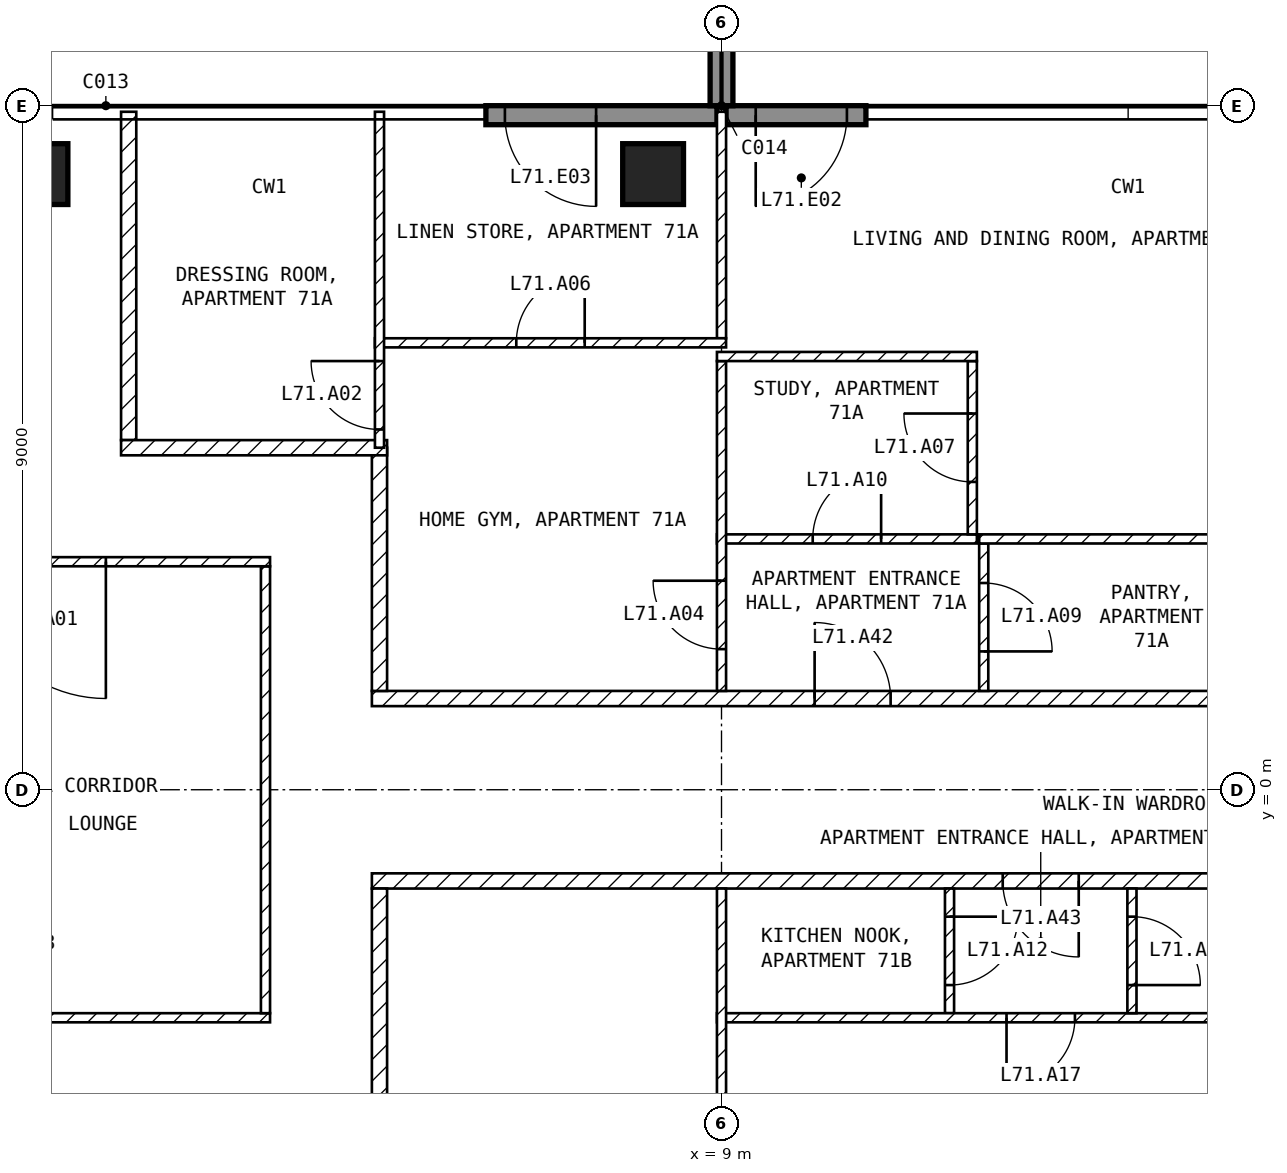
"""IFC4 building model, lengths in metres.
Left out: names, types, materials, properties, quantities, classifications, styles, units other than length and angle.
Written with IfcOpenShell. Run it as: python <this file> out.ifc"""

import sys

from ifc_helpers import new_model, si_unit, direction, frame, frame_2d, origin, origin_2d, place, context, subcontext, project, spatial, rectangle, extrude, element, fill, save


model = new_model("IFC4")
c1 = context("Model", 3, precision=1e-05, world=origin(), true_north=direction((0.0, 1.0)))
c2 = subcontext(c1, "Body", "Model", "MODEL_VIEW")
j1 = project(units=[si_unit("LENGTHUNIT", "METRE"), si_unit("PLANEANGLEUNIT", "RADIAN")], contexts=[c1])
p1 = place(None, origin())
s1 = spatial("IfcSite", under=j1, at=p1, CompositionType="ELEMENT")
p2 = place(p1, origin())
s2 = spatial("IfcBuilding", under=s1, at=p2, CompositionType="ELEMENT")
p3 = place(p2, frame((0.0, 0.0, 278.0)))
s3 = spatial("IfcBuildingStorey", under=s2, at=p3, CompositionType="ELEMENT", Elevation=278.0)
for number, where, z_axis, x_axis in (
    (1, (0.0, 8.1, -0.25), (0.0, 0.0, 1.0), (1.0, 0.0, 0.0)),
    (2, (8.1, 8.1, -0.25), (0.0, 0.0, 1.0), (1.0, 0.0, 0.0)),
):
    element("IfcColumn", number, at=place(p3, frame(where, z_axis=z_axis, x_axis=x_axis)), inside=s3, PredefinedType="COLUMN", context=c2, shape_type="SweptSolid", body=[
        extrude(rectangle(XDim=0.8, YDim=0.8, at=origin_2d()), origin(), (0.0, 0.0, 1.0), 3.5),
    ])
p4 = place(p3, frame((10.9, 8.875, 0.0), z_axis=(0.0, 0.0, 1.0), x_axis=(-1.0, 0.0, 0.0)))
e3 = element("IfcWall", 3, at=p4, inside=s3, PredefinedType="SOLIDWALL", context=c2, shape_type="SweptSolid", body=[
    extrude(rectangle(XDim=1.84, YDim=0.25, at=frame_2d((0.92, 0.0))), origin(), (0.0, 0.0, 1.0), 3.25),
])
p5 = place(p4, frame((0.25, 0.0, 0.0)))
e4 = element("IfcOpeningElement", 4, at=p5, cuts=e3, PredefinedType="OPENING", context=c2, shape_type="SweptSolid", body=[
    extrude(rectangle(XDim=1.2, YDim=2.4, at=frame_2d((0.6, 1.2))), frame((0.0, 0.135, 0.0), z_axis=(0.0, -1.0, 0.0), x_axis=(1.0, 0.0, 0.0)), (0.0, 0.0, 1.0), 0.27),
])
p6 = place(p3, frame((8.94, 8.875, 0.0), z_axis=(0.0, 0.0, 1.0), x_axis=(-1.0, 0.0, 0.0)))
e5 = element("IfcWall", 5, at=p6, inside=s3, PredefinedType="SOLIDWALL", context=c2, shape_type="SweptSolid", body=[
    extrude(rectangle(XDim=3.04, YDim=0.25, at=frame_2d((1.52, 0.0))), origin(), (0.0, 0.0, 1.0), 3.25),
])
p7 = place(p6, frame((1.59, 0.0, 0.0)))
e6 = element("IfcOpeningElement", 6, at=p7, cuts=e5, PredefinedType="OPENING", context=c2, shape_type="SweptSolid", body=[
    extrude(rectangle(XDim=1.2, YDim=2.4, at=frame_2d((0.6, 1.2))), frame((0.0, 0.135, 0.0), z_axis=(0.0, -1.0, 0.0), x_axis=(1.0, 0.0, 0.0)), (0.0, 0.0, 1.0), 0.27),
])
p8 = place(p3, frame((9.0, 9.0, 0.0), z_axis=(0.0, 0.0, 1.0), x_axis=(0.0, 1.0, 0.0)))
e7 = element("IfcWall", 7, at=p8, inside=s3, PredefinedType="SOLIDWALL", context=c2, shape_type="SweptSolid", body=[
    extrude(rectangle(XDim=2.7, YDim=0.3, at=frame_2d((1.35, 0.0))), origin(), (0.0, 0.0, 1.0), 3.25),
])
p9 = place(p3, frame((-3.06, -3.0, 0.0), z_axis=(0.0, 0.0, 1.0), x_axis=(1.0, 0.0, 0.0)))
e8 = element("IfcWall", 8, at=p9, inside=s3, PredefinedType="PARTITIONING", context=c2, shape_type="SweptSolid", body=[
    extrude(rectangle(XDim=6.12, YDim=0.12, at=frame_2d((3.06, 0.0))), origin(), (0.0, 0.0, 1.0), 3.25),
])
p10 = place(p3, frame((3.0, -2.94, 0.0), z_axis=(0.0, 0.0, 1.0), x_axis=(0.0, 1.0, 0.0)))
e9 = element("IfcWall", 9, at=p10, inside=s3, PredefinedType="PARTITIONING", context=c2, shape_type="SweptSolid", body=[
    extrude(rectangle(XDim=5.88, YDim=0.12, at=frame_2d((2.94, 0.0))), origin(), (0.0, 0.0, 1.0), 3.25),
])
p11 = place(p3, frame((3.06, 3.0, 0.0), z_axis=(0.0, 0.0, 1.0), x_axis=(-1.0, 0.0, 0.0)))
e10 = element("IfcWall", 10, at=p11, inside=s3, PredefinedType="PARTITIONING", context=c2, shape_type="SweptSolid", body=[
    extrude(rectangle(XDim=6.12, YDim=0.12, at=frame_2d((3.06, 0.0))), origin(), (0.0, 0.0, 1.0), 3.25),
])
p12 = place(p11, frame((2.16, 0.0, 0.0)))
e11 = element("IfcOpeningElement", 11, at=p12, cuts=e10, PredefinedType="OPENING", context=c2, shape_type="SweptSolid", body=[
    extrude(rectangle(XDim=1.8, YDim=2.1, at=frame_2d((0.9, 1.05))), frame((0.0, 0.07, 0.0), z_axis=(0.0, -1.0, 0.0), x_axis=(1.0, 0.0, 0.0)), (0.0, 0.0, 1.0), 0.14),
])
p13 = place(p3, frame((4.4, 1.2, 0.0), z_axis=(0.0, 0.0, 1.0), x_axis=(1.0, 0.0, 0.0)))
e12 = element("IfcWall", 12, at=p13, inside=s3, PredefinedType="PARTITIONING", context=c2, shape_type="SweptSolid", body=[
    extrude(rectangle(XDim=17.2, YDim=0.2, at=frame_2d((8.6, 0.0))), origin(), (0.0, 0.0, 1.0), 3.25),
])
p14 = place(p13, frame((5.825, 0.0, 0.0)))
e13 = element("IfcOpeningElement", 13, at=p14, cuts=e12, PredefinedType="OPENING", context=c2, shape_type="SweptSolid", body=[
    extrude(rectangle(XDim=1.0, YDim=2.1, at=frame_2d((0.5, 1.05))), frame((0.0, 0.11, 0.0), z_axis=(0.0, -1.0, 0.0), x_axis=(1.0, 0.0, 0.0)), (0.0, 0.0, 1.0), 0.22),
])
p15 = place(p3, frame((4.5, 4.5, 0.0), z_axis=(0.0, 0.0, 1.0), x_axis=(0.0, -1.0, 0.0)))
e14 = element("IfcWall", 14, at=p15, inside=s3, PredefinedType="PARTITIONING", context=c2, shape_type="SweptSolid", body=[
    extrude(rectangle(XDim=3.2, YDim=0.2, at=frame_2d((1.6, 0.0))), origin(), (0.0, 0.0, 1.0), 3.25),
])
p16 = place(p3, frame((1.2, 8.92, 0.0), z_axis=(0.0, 0.0, 1.0), x_axis=(0.0, -1.0, 0.0)))
e15 = element("IfcWall", 15, at=p16, inside=s3, PredefinedType="PARTITIONING", context=c2, shape_type="SweptSolid", body=[
    extrude(rectangle(XDim=4.32, YDim=0.2, at=frame_2d((2.16, 0.0))), origin(), (0.0, 0.0, 1.0), 3.25),
])
p17 = place(p3, frame((1.1, 4.5, 0.0), z_axis=(0.0, 0.0, 1.0), x_axis=(1.0, 0.0, 0.0)))
e16 = element("IfcWall", 16, at=p17, inside=s3, PredefinedType="PARTITIONING", context=c2, shape_type="SweptSolid", body=[
    extrude(rectangle(XDim=3.5, YDim=0.2, at=frame_2d((1.75, 0.0))), origin(), (0.0, 0.0, 1.0), 3.25),
])
p18 = place(p3, frame((21.6, -1.2, 0.0), z_axis=(0.0, 0.0, 1.0), x_axis=(-1.0, 0.0, 0.0)))
e17 = element("IfcWall", 17, at=p18, inside=s3, PredefinedType="PARTITIONING", context=c2, shape_type="SweptSolid", body=[
    extrude(rectangle(XDim=17.2, YDim=0.2, at=frame_2d((8.6, 0.0))), origin(), (0.0, 0.0, 1.0), 3.25),
])
p19 = place(p18, frame((7.9, 0.0, 0.0)))
e18 = element("IfcOpeningElement", 18, at=p19, cuts=e17, PredefinedType="OPENING", context=c2, shape_type="SweptSolid", body=[
    extrude(rectangle(XDim=1.0, YDim=2.1, at=frame_2d((0.5, 1.05))), frame((0.0, 0.11, 0.0), z_axis=(0.0, -1.0, 0.0), x_axis=(1.0, 0.0, 0.0)), (0.0, 0.0, 1.0), 0.22),
])
p20 = place(p3, frame((4.5, -1.3, 0.0), z_axis=(0.0, 0.0, 1.0), x_axis=(0.0, -1.0, 0.0)))
e19 = element("IfcWall", 19, at=p20, inside=s3, PredefinedType="PARTITIONING", context=c2, shape_type="SweptSolid", body=[
    extrude(rectangle(XDim=3.2, YDim=0.2, at=frame_2d((1.6, 0.0))), origin(), (0.0, 0.0, 1.0), 3.25),
])
p21 = place(p3, frame((12.45, 3.24, 0.0), z_axis=(0.0, 0.0, 1.0), x_axis=(0.0, -1.0, 0.0)))
e20 = element("IfcWall", 20, at=p21, inside=s3, PredefinedType="PARTITIONING", context=c2, shape_type="SweptSolid", body=[
    extrude(rectangle(XDim=1.94, YDim=0.12, at=frame_2d((0.97, 0.0))), origin(), (0.0, 0.0, 1.0), 3.25),
])
p22 = place(p21, frame((0.52, 0.0, 0.0)))
e21 = element("IfcOpeningElement", 21, at=p22, cuts=e20, PredefinedType="OPENING", context=c2, shape_type="SweptSolid", body=[
    extrude(rectangle(XDim=0.9, YDim=2.1, at=frame_2d((0.45, 1.05))), frame((0.0, 0.07, 0.0), z_axis=(0.0, -1.0, 0.0), x_axis=(1.0, 0.0, 0.0)), (0.0, 0.0, 1.0), 0.14),
])
p23 = place(p3, frame((8.94, 3.3, 0.0), z_axis=(0.0, 0.0, 1.0), x_axis=(1.0, 0.0, 0.0)))
e22 = element("IfcWall", 22, at=p23, inside=s3, PredefinedType="PARTITIONING", context=c2, shape_type="SweptSolid", body=[
    extrude(rectangle(XDim=3.42, YDim=0.12, at=frame_2d((1.71, 0.0))), origin(), (0.0, 0.0, 1.0), 3.25),
])
p24 = place(p23, frame((1.26, 0.0, 0.0)))
e23 = element("IfcOpeningElement", 23, at=p24, cuts=e22, PredefinedType="OPENING", context=c2, shape_type="SweptSolid", body=[
    extrude(rectangle(XDim=0.9, YDim=2.1, at=frame_2d((0.45, 1.05))), frame((0.0, 0.07, 0.0), z_axis=(0.0, -1.0, 0.0), x_axis=(1.0, 0.0, 0.0)), (0.0, 0.0, 1.0), 0.14),
])
p25 = place(p3, frame((9.0, 1.3, 0.0), z_axis=(0.0, 0.0, 1.0), x_axis=(0.0, 1.0, 0.0)))
e24 = element("IfcWall", 24, at=p25, inside=s3, PredefinedType="PARTITIONING", context=c2, shape_type="SweptSolid", body=[
    extrude(rectangle(XDim=4.34, YDim=0.12, at=frame_2d((2.17, 0.0))), origin(), (0.0, 0.0, 1.0), 3.25),
])
p26 = place(p25, frame((0.55, 0.0, 0.0)))
e25 = element("IfcOpeningElement", 25, at=p26, cuts=e24, PredefinedType="OPENING", context=c2, shape_type="SweptSolid", body=[
    extrude(rectangle(XDim=0.9, YDim=2.1, at=frame_2d((0.45, 1.05))), frame((0.0, 0.07, 0.0), z_axis=(0.0, -1.0, 0.0), x_axis=(1.0, 0.0, 0.0)), (0.0, 0.0, 1.0), 0.14),
])
p27 = place(p3, frame((12.39, 3.3, 0.0), z_axis=(0.0, 0.0, 1.0), x_axis=(1.0, 0.0, 0.0)))
e26 = element("IfcWall", 26, at=p27, inside=s3, PredefinedType="PARTITIONING", context=c2, shape_type="SweptSolid", body=[
    extrude(rectangle(XDim=6.81, YDim=0.12, at=frame_2d((3.405, 0.0))), origin(), (0.0, 0.0, 1.0), 3.25),
])
p28 = place(p27, frame((3.96, 0.0, 0.0)))
e27 = element("IfcOpeningElement", 27, at=p28, cuts=e26, PredefinedType="OPENING", context=c2, shape_type="SweptSolid", body=[
    extrude(rectangle(XDim=0.9, YDim=2.1, at=frame_2d((0.45, 1.05))), frame((0.0, 0.07, 0.0), z_axis=(0.0, -1.0, 0.0), x_axis=(1.0, 0.0, 0.0)), (0.0, 0.0, 1.0), 0.14),
])
p29 = place(p3, frame((12.3, 3.36, 0.0), z_axis=(0.0, 0.0, 1.0), x_axis=(0.0, 1.0, 0.0)))
e28 = element("IfcWall", 28, at=p29, inside=s3, PredefinedType="PARTITIONING", context=c2, shape_type="SweptSolid", body=[
    extrude(rectangle(XDim=2.28, YDim=0.12, at=frame_2d((1.14, 0.0))), origin(), (0.0, 0.0, 1.0), 3.25),
])
p30 = place(p29, frame((0.69, 0.0, 0.0)))
e29 = element("IfcOpeningElement", 29, at=p30, cuts=e28, PredefinedType="OPENING", context=c2, shape_type="SweptSolid", body=[
    extrude(rectangle(XDim=0.9, YDim=2.1, at=frame_2d((0.45, 1.05))), frame((0.0, 0.07, 0.0), z_axis=(0.0, -1.0, 0.0), x_axis=(1.0, 0.0, 0.0)), (0.0, 0.0, 1.0), 0.14),
])
p31 = place(p3, frame((12.36, 5.7, 0.0), z_axis=(0.0, 0.0, 1.0), x_axis=(-1.0, 0.0, 0.0)))
e30 = element("IfcWall", 30, at=p31, inside=s3, PredefinedType="PARTITIONING", context=c2, shape_type="SweptSolid", body=[
    extrude(rectangle(XDim=3.42, YDim=0.12, at=frame_2d((1.71, 0.0))), origin(), (0.0, 0.0, 1.0), 3.25),
])
p32 = place(p3, frame((9.0, 5.94, 0.0), z_axis=(0.0, 0.0, 1.0), x_axis=(0.0, 1.0, 0.0)))
e31 = element("IfcWall", 31, at=p32, inside=s3, PredefinedType="PARTITIONING", context=c2, shape_type="SweptSolid", body=[
    extrude(rectangle(XDim=2.98, YDim=0.12, at=frame_2d((1.49, 0.0))), origin(), (0.0, 0.0, 1.0), 3.25),
])
p33 = place(p3, frame((4.44, 5.88, 0.0), z_axis=(0.0, 0.0, 1.0), x_axis=(1.0, 0.0, 0.0)))
e32 = element("IfcWall", 32, at=p33, inside=s3, PredefinedType="PARTITIONING", context=c2, shape_type="SweptSolid", body=[
    extrude(rectangle(XDim=4.62, YDim=0.12, at=frame_2d((2.31, 0.0))), origin(), (0.0, 0.0, 1.0), 3.25),
])
p34 = place(p33, frame((1.86, 0.0, 0.0)))
e33 = element("IfcOpeningElement", 33, at=p34, cuts=e32, PredefinedType="OPENING", context=c2, shape_type="SweptSolid", body=[
    extrude(rectangle(XDim=0.9, YDim=2.1, at=frame_2d((0.45, 1.05))), frame((0.0, 0.07, 0.0), z_axis=(0.0, -1.0, 0.0), x_axis=(1.0, 0.0, 0.0)), (0.0, 0.0, 1.0), 0.14),
])
p35 = place(p3, frame((4.5, 4.5, 0.0), z_axis=(0.0, 0.0, 1.0), x_axis=(0.0, 1.0, 0.0)))
e34 = element("IfcWall", 34, at=p35, inside=s3, PredefinedType="PARTITIONING", context=c2, shape_type="SweptSolid", body=[
    extrude(rectangle(XDim=4.42, YDim=0.12, at=frame_2d((2.21, 0.0))), origin(), (0.0, 0.0, 1.0), 3.25),
])
p36 = place(p35, frame((0.24, 0.0, 0.0)))
e35 = element("IfcOpeningElement", 35, at=p36, cuts=e34, PredefinedType="OPENING", context=c2, shape_type="SweptSolid", body=[
    extrude(rectangle(XDim=0.9, YDim=2.1, at=frame_2d((0.45, 1.05))), frame((0.0, 0.07, 0.0), z_axis=(0.0, -1.0, 0.0), x_axis=(1.0, 0.0, 0.0)), (0.0, 0.0, 1.0), 0.14),
])
p37 = place(p3, frame((12.0, -1.3, 0.0), z_axis=(0.0, 0.0, 1.0), x_axis=(0.0, -1.0, 0.0)))
e36 = element("IfcWall", 36, at=p37, inside=s3, PredefinedType="PARTITIONING", context=c2, shape_type="SweptSolid", body=[
    extrude(rectangle(XDim=1.64, YDim=0.12, at=frame_2d((0.82, 0.0))), origin(), (0.0, 0.0, 1.0), 3.25),
])
p38 = place(p37, frame((0.37, 0.0, 0.0)))
e37 = element("IfcOpeningElement", 37, at=p38, cuts=e36, PredefinedType="OPENING", context=c2, shape_type="SweptSolid", body=[
    extrude(rectangle(XDim=0.9, YDim=2.1, at=frame_2d((0.45, 1.05))), frame((0.0, 0.07, 0.0), z_axis=(0.0, -1.0, 0.0), x_axis=(1.0, 0.0, 0.0)), (0.0, 0.0, 1.0), 0.14),
])
p39 = place(p3, frame((16.8, -3.0, 0.0), z_axis=(0.0, 0.0, 1.0), x_axis=(-1.0, 0.0, 0.0)))
e38 = element("IfcWall", 38, at=p39, inside=s3, PredefinedType="PARTITIONING", context=c2, shape_type="SweptSolid", body=[
    extrude(rectangle(XDim=7.86, YDim=0.12, at=frame_2d((3.93, 0.0))), origin(), (0.0, 0.0, 1.0), 3.25),
])
p40 = place(p39, frame((3.15, 0.0, 0.0)))
e39 = element("IfcOpeningElement", 39, at=p40, cuts=e38, PredefinedType="OPENING", context=c2, shape_type="SweptSolid", body=[
    extrude(rectangle(XDim=0.9, YDim=2.1, at=frame_2d((0.45, 1.05))), frame((0.0, 0.07, 0.0), z_axis=(0.0, -1.0, 0.0), x_axis=(1.0, 0.0, 0.0)), (0.0, 0.0, 1.0), 0.14),
])
p41 = place(p3, frame((9.0, -8.92, 0.0), z_axis=(0.0, 0.0, 1.0), x_axis=(0.0, 1.0, 0.0)))
e40 = element("IfcWall", 40, at=p41, inside=s3, PredefinedType="PARTITIONING", context=c2, shape_type="SweptSolid", body=[
    extrude(rectangle(XDim=7.62, YDim=0.12, at=frame_2d((3.81, 0.0))), origin(), (0.0, 0.0, 1.0), 3.25),
])
p42 = place(p41, frame((2.62, 0.0, 0.0)))
e41 = element("IfcOpeningElement", 41, at=p42, cuts=e40, PredefinedType="OPENING", context=c2, shape_type="SweptSolid", body=[
    extrude(rectangle(XDim=0.9, YDim=2.1, at=frame_2d((0.45, 1.05))), frame((0.0, 0.07, 0.0), z_axis=(0.0, -1.0, 0.0), x_axis=(1.0, 0.0, 0.0)), (0.0, 0.0, 1.0), 0.14),
])
p43 = place(p3, frame((14.4, -1.3, 0.0), z_axis=(0.0, 0.0, 1.0), x_axis=(0.0, -1.0, 0.0)))
e42 = element("IfcWall", 42, at=p43, inside=s3, PredefinedType="PARTITIONING", context=c2, shape_type="SweptSolid", body=[
    extrude(rectangle(XDim=1.64, YDim=0.12, at=frame_2d((0.82, 0.0))), origin(), (0.0, 0.0, 1.0), 3.25),
])
p44 = place(p43, frame((0.37, 0.0, 0.0)))
e43 = element("IfcOpeningElement", 43, at=p44, cuts=e42, PredefinedType="OPENING", context=c2, shape_type="SweptSolid", body=[
    extrude(rectangle(XDim=0.9, YDim=2.1, at=frame_2d((0.45, 1.05))), frame((0.0, 0.07, 0.0), z_axis=(0.0, -1.0, 0.0), x_axis=(1.0, 0.0, 0.0)), (0.0, 0.0, 1.0), 0.14),
])
p45 = place(p5, origin())
e44 = element("IfcDoor", 44, at=p45, inside=s3, OperationType="SINGLE_SWING_RIGHT", PredefinedType="DOOR", context=c2, shape_type="SweptSolid", body=[
    extrude(rectangle(XDim=1.2, YDim=2.4, at=frame_2d((0.6, 1.2))), frame((0.0, 0.025, 0.0), z_axis=(0.0, -1.0, 0.0), x_axis=(1.0, 0.0, 0.0)), (0.0, 0.0, 1.0), 0.05),
])
fill(e4, e44)
p46 = place(p7, origin())
e45 = element("IfcDoor", 45, at=p46, inside=s3, OperationType="SINGLE_SWING_LEFT", PredefinedType="DOOR", context=c2, shape_type="SweptSolid", body=[
    extrude(rectangle(XDim=1.2, YDim=2.4, at=frame_2d((0.6, 1.2))), frame((0.0, 0.025, 0.0), z_axis=(0.0, -1.0, 0.0), x_axis=(1.0, 0.0, 0.0)), (0.0, 0.0, 1.0), 0.05),
])
fill(e6, e45)
p47 = place(p12, origin())
e46 = element("IfcDoor", 46, at=p47, inside=s3, OperationType="SINGLE_SWING_LEFT", PredefinedType="DOOR", context=c2, shape_type="SweptSolid", body=[
    extrude(rectangle(XDim=1.8, YDim=2.1, at=frame_2d((0.9, 1.05))), frame((0.0, 0.025, 0.0), z_axis=(0.0, -1.0, 0.0), x_axis=(1.0, 0.0, 0.0)), (0.0, 0.0, 1.0), 0.05),
])
fill(e11, e46)
p48 = place(p36, origin())
e47 = element("IfcDoor", 47, at=p48, inside=s3, OperationType="SINGLE_SWING_RIGHT", PredefinedType="DOOR", context=c2, shape_type="SweptSolid", body=[
    extrude(rectangle(XDim=0.9, YDim=2.1, at=frame_2d((0.45, 1.05))), frame((0.0, 0.025, 0.0), z_axis=(0.0, -1.0, 0.0), x_axis=(1.0, 0.0, 0.0)), (0.0, 0.0, 1.0), 0.05),
])
fill(e35, e47)
p49 = place(p26, origin())
e48 = element("IfcDoor", 48, at=p49, inside=s3, OperationType="SINGLE_SWING_RIGHT", PredefinedType="DOOR", context=c2, shape_type="SweptSolid", body=[
    extrude(rectangle(XDim=0.9, YDim=2.1, at=frame_2d((0.45, 1.05))), frame((0.0, 0.025, 0.0), z_axis=(0.0, -1.0, 0.0), x_axis=(1.0, 0.0, 0.0)), (0.0, 0.0, 1.0), 0.05),
])
fill(e25, e48)
p50 = place(p34, origin())
e49 = element("IfcDoor", 49, at=p50, inside=s3, OperationType="SINGLE_SWING_RIGHT", PredefinedType="DOOR", context=c2, shape_type="SweptSolid", body=[
    extrude(rectangle(XDim=0.9, YDim=2.1, at=frame_2d((0.45, 1.05))), frame((0.0, 0.025, 0.0), z_axis=(0.0, -1.0, 0.0), x_axis=(1.0, 0.0, 0.0)), (0.0, 0.0, 1.0), 0.05),
])
fill(e33, e49)
p51 = place(p30, origin())
e50 = element("IfcDoor", 50, at=p51, inside=s3, OperationType="SINGLE_SWING_RIGHT", PredefinedType="DOOR", context=c2, shape_type="SweptSolid", body=[
    extrude(rectangle(XDim=0.9, YDim=2.1, at=frame_2d((0.45, 1.05))), frame((0.0, 0.025, 0.0), z_axis=(0.0, -1.0, 0.0), x_axis=(1.0, 0.0, 0.0)), (0.0, 0.0, 1.0), 0.05),
])
fill(e29, e50)
p52 = place(p22, origin())
e51 = element("IfcDoor", 51, at=p52, inside=s3, OperationType="SINGLE_SWING_RIGHT", PredefinedType="DOOR", context=c2, shape_type="SweptSolid", body=[
    extrude(rectangle(XDim=0.9, YDim=2.1, at=frame_2d((0.45, 1.05))), frame((0.0, 0.025, 0.0), z_axis=(0.0, -1.0, 0.0), x_axis=(1.0, 0.0, 0.0)), (0.0, 0.0, 1.0), 0.05),
])
fill(e21, e51)
p53 = place(p24, origin())
e52 = element("IfcDoor", 52, at=p53, inside=s3, OperationType="SINGLE_SWING_RIGHT", PredefinedType="DOOR", context=c2, shape_type="SweptSolid", body=[
    extrude(rectangle(XDim=0.9, YDim=2.1, at=frame_2d((0.45, 1.05))), frame((0.0, 0.025, 0.0), z_axis=(0.0, -1.0, 0.0), x_axis=(1.0, 0.0, 0.0)), (0.0, 0.0, 1.0), 0.05),
])
fill(e23, e52)
p54 = place(p38, origin())
e53 = element("IfcDoor", 53, at=p54, inside=s3, OperationType="SINGLE_SWING_LEFT", PredefinedType="DOOR", context=c2, shape_type="SweptSolid", body=[
    extrude(rectangle(XDim=0.9, YDim=2.1, at=frame_2d((0.45, 1.05))), frame((0.0, 0.025, 0.0), z_axis=(0.0, -1.0, 0.0), x_axis=(1.0, 0.0, 0.0)), (0.0, 0.0, 1.0), 0.05),
])
fill(e37, e53)
p55 = place(p40, origin())
e54 = element("IfcDoor", 54, at=p55, inside=s3, OperationType="SINGLE_SWING_RIGHT", PredefinedType="DOOR", context=c2, shape_type="SweptSolid", body=[
    extrude(rectangle(XDim=0.9, YDim=2.1, at=frame_2d((0.45, 1.05))), frame((0.0, 0.025, 0.0), z_axis=(0.0, -1.0, 0.0), x_axis=(1.0, 0.0, 0.0)), (0.0, 0.0, 1.0), 0.05),
])
fill(e39, e54)
p56 = place(p44, origin())
e55 = element("IfcDoor", 55, at=p56, inside=s3, OperationType="SINGLE_SWING_RIGHT", PredefinedType="DOOR", context=c2, shape_type="SweptSolid", body=[
    extrude(rectangle(XDim=0.9, YDim=2.1, at=frame_2d((0.45, 1.05))), frame((0.0, 0.025, 0.0), z_axis=(0.0, -1.0, 0.0), x_axis=(1.0, 0.0, 0.0)), (0.0, 0.0, 1.0), 0.05),
])
fill(e43, e55)
p57 = place(p14, origin())
e56 = element("IfcDoor", 56, at=p57, inside=s3, OperationType="SINGLE_SWING_LEFT", PredefinedType="DOOR", context=c2, shape_type="SweptSolid", body=[
    extrude(rectangle(XDim=1.0, YDim=2.1, at=frame_2d((0.5, 1.05))), frame((0.0, 0.025, 0.0), z_axis=(0.0, -1.0, 0.0), x_axis=(1.0, 0.0, 0.0)), (0.0, 0.0, 1.0), 0.05),
])
fill(e13, e56)
p58 = place(p19, origin())
e57 = element("IfcDoor", 57, at=p58, inside=s3, OperationType="SINGLE_SWING_LEFT", PredefinedType="DOOR", context=c2, shape_type="SweptSolid", body=[
    extrude(rectangle(XDim=1.0, YDim=2.1, at=frame_2d((0.5, 1.05))), frame((0.0, 0.025, 0.0), z_axis=(0.0, -1.0, 0.0), x_axis=(1.0, 0.0, 0.0)), (0.0, 0.0, 1.0), 0.05),
])
fill(e18, e57)
save(model, sys.argv[1])
